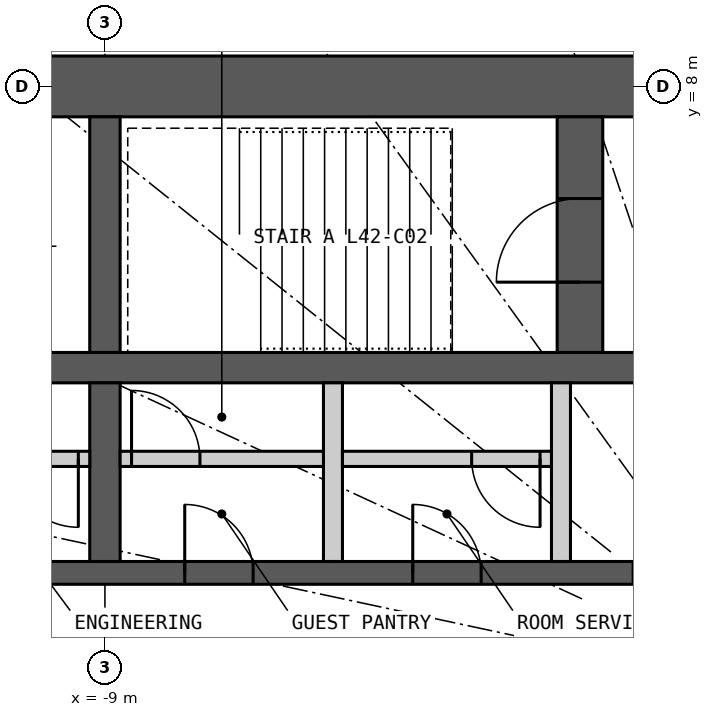
"""IFC4 building model, lengths in metres.
Left out: names, types, materials, properties, quantities, classifications, styles, units other than length and angle.
Written with IfcOpenShell. Run it as: python <this file> out.ifc"""

import sys

from ifc_helpers import new_model, si_unit, direction, frame, frame_2d, origin, place, context, subcontext, project, spatial, rectangle, extrude, element, fill, save


model = new_model("IFC4")
c1 = context("Model", 3, precision=1e-05, world=origin(), true_north=direction((0.0, 1.0)))
c2 = subcontext(c1, "Body", "Model", "MODEL_VIEW")
j1 = project(units=[si_unit("LENGTHUNIT", "METRE"), si_unit("PLANEANGLEUNIT", "RADIAN")], contexts=[c1])
p1 = place(None, origin())
s1 = spatial("IfcSite", under=j1, at=p1, CompositionType="ELEMENT")
p2 = place(p1, origin())
s2 = spatial("IfcBuilding", under=s1, at=p2, CompositionType="ELEMENT")
p3 = place(p2, frame((0.0, 0.0, 159.9)))
s3 = spatial("IfcBuildingStorey", under=s2, at=p3, CompositionType="ELEMENT", Elevation=159.9)
p4 = place(p3, frame((-12.4, 8.0, 0.0), z_axis=(0.0, 0.0, 1.0), x_axis=(1.0, 0.0, 0.0)))
e1 = element("IfcWall", 1, at=p4, inside=s3, PredefinedType="SHEAR", context=c2, shape_type="SweptSolid", body=[
    extrude(rectangle(XDim=24.8, YDim=0.8, at=frame_2d((12.4, 0.0))), origin(), (0.0, 0.0, 1.0), 3.3),
])
p5 = place(p4, frame((11.1, 0.0, 0.0)))
e2 = element("IfcOpeningElement", 2, at=p5, cuts=e1, PredefinedType="OPENING", context=c2, shape_type="SweptSolid", body=[
    extrude(rectangle(XDim=1.2, YDim=2.2, at=frame_2d((0.6, 1.1))), frame((0.0, 0.41, 0.0), z_axis=(0.0, -1.0, 0.0), x_axis=(1.0, 0.0, 0.0)), (0.0, 0.0, 1.0), 0.82),
])
p6 = place(p4, frame((18.7, 0.0, 0.0)))
e3 = element("IfcOpeningElement", 3, at=p6, cuts=e1, PredefinedType="OPENING", context=c2, shape_type="SweptSolid", body=[
    extrude(rectangle(XDim=0.9, YDim=2.2, at=frame_2d((0.45, 1.1))), frame((0.0, 0.41, 0.0), z_axis=(0.0, -1.0, 0.0), x_axis=(1.0, 0.0, 0.0)), (0.0, 0.0, 1.0), 0.82),
])
p7 = place(p3, frame((-11.6, 4.3, 0.0), z_axis=(0.0, 0.0, 1.0), x_axis=(1.0, 0.0, 0.0)))
e4 = element("IfcWall", 4, at=p7, inside=s3, PredefinedType="SHEAR", context=c2, shape_type="SweptSolid", body=[
    extrude(rectangle(XDim=23.2, YDim=0.4, at=frame_2d((11.6, 0.0))), origin(), (0.0, 0.0, 1.0), 3.3),
])
p8 = place(p3, frame((-11.6, 1.6, 0.0), z_axis=(0.0, 0.0, 1.0), x_axis=(1.0, 0.0, 0.0)))
e5 = element("IfcWall", 5, at=p8, inside=s3, PredefinedType="SHEAR", context=c2, shape_type="SweptSolid", body=[
    extrude(rectangle(XDim=23.2, YDim=0.3, at=frame_2d((11.6, 0.0))), origin(), (0.0, 0.0, 1.0), 3.3),
])
p9 = place(p8, frame((9.55, 0.0, 0.0)))
e6 = element("IfcOpeningElement", 6, at=p9, cuts=e5, PredefinedType="OPENING", context=c2, shape_type="SweptSolid", body=[
    extrude(rectangle(XDim=1.1, YDim=2.2, at=frame_2d((0.55, 1.1))), frame((0.0, 0.16, 0.0), z_axis=(0.0, -1.0, 0.0), x_axis=(1.0, 0.0, 0.0)), (0.0, 0.0, 1.0), 0.32),
])
p10 = place(p8, frame((12.55, 0.0, 0.0)))
e7 = element("IfcOpeningElement", 7, at=p10, cuts=e5, PredefinedType="OPENING", context=c2, shape_type="SweptSolid", body=[
    extrude(rectangle(XDim=1.1, YDim=2.2, at=frame_2d((0.55, 1.1))), frame((0.0, 0.16, 0.0), z_axis=(0.0, -1.0, 0.0), x_axis=(1.0, 0.0, 0.0)), (0.0, 0.0, 1.0), 0.32),
])
p11 = place(p8, frame((0.65, 0.0, 0.0)))
e8 = element("IfcOpeningElement", 8, at=p11, cuts=e5, PredefinedType="OPENING", context=c2, shape_type="SweptSolid", body=[
    extrude(rectangle(XDim=0.9, YDim=2.2, at=frame_2d((0.45, 1.1))), frame((0.0, 0.16, 0.0), z_axis=(0.0, -1.0, 0.0), x_axis=(1.0, 0.0, 0.0)), (0.0, 0.0, 1.0), 0.32),
])
p12 = place(p8, frame((21.65, 0.0, 0.0)))
e9 = element("IfcOpeningElement", 9, at=p12, cuts=e5, PredefinedType="OPENING", context=c2, shape_type="SweptSolid", body=[
    extrude(rectangle(XDim=0.9, YDim=2.2, at=frame_2d((0.45, 1.1))), frame((0.0, 0.16, 0.0), z_axis=(0.0, -1.0, 0.0), x_axis=(1.0, 0.0, 0.0)), (0.0, 0.0, 1.0), 0.32),
])
p13 = place(p8, frame((3.65, 0.0, 0.0)))
e10 = element("IfcOpeningElement", 10, at=p13, cuts=e5, PredefinedType="OPENING", context=c2, shape_type="SweptSolid", body=[
    extrude(rectangle(XDim=0.9, YDim=2.2, at=frame_2d((0.45, 1.1))), frame((0.0, 0.16, 0.0), z_axis=(0.0, -1.0, 0.0), x_axis=(1.0, 0.0, 0.0)), (0.0, 0.0, 1.0), 0.32),
])
p14 = place(p8, frame((6.65, 0.0, 0.0)))
e11 = element("IfcOpeningElement", 11, at=p14, cuts=e5, PredefinedType="OPENING", context=c2, shape_type="SweptSolid", body=[
    extrude(rectangle(XDim=0.9, YDim=2.2, at=frame_2d((0.45, 1.1))), frame((0.0, 0.16, 0.0), z_axis=(0.0, -1.0, 0.0), x_axis=(1.0, 0.0, 0.0)), (0.0, 0.0, 1.0), 0.32),
])
p15 = place(p3, frame((-9.0, 4.5, 0.0), z_axis=(0.0, 0.0, 1.0), x_axis=(0.0, 1.0, 0.0)))
e12 = element("IfcWall", 12, at=p15, inside=s3, PredefinedType="SHEAR", context=c2, shape_type="SweptSolid", body=[
    extrude(rectangle(XDim=3.1, YDim=0.4, at=frame_2d((1.55, 0.0))), origin(), (0.0, 0.0, 1.0), 3.3),
])
p16 = place(p3, frame((-9.0, 1.75, 0.0), z_axis=(0.0, 0.0, 1.0), x_axis=(0.0, 1.0, 0.0)))
e13 = element("IfcWall", 13, at=p16, inside=s3, PredefinedType="SHEAR", context=c2, shape_type="SweptSolid", body=[
    extrude(rectangle(XDim=2.35, YDim=0.4, at=frame_2d((1.175, 0.0))), origin(), (0.0, 0.0, 1.0), 3.3),
])
p17 = place(p3, frame((-2.75, 4.5, 0.0), z_axis=(0.0, 0.0, 1.0), x_axis=(0.0, 1.0, 0.0)))
e14 = element("IfcWall", 14, at=p17, inside=s3, PredefinedType="SHEAR", context=c2, shape_type="SweptSolid", body=[
    extrude(rectangle(XDim=3.1, YDim=0.6, at=frame_2d((1.55, 0.0))), origin(), (0.0, 0.0, 1.0), 3.3),
])
p18 = place(p17, frame((0.925, 0.0, 0.0)))
e15 = element("IfcOpeningElement", 15, at=p18, cuts=e14, PredefinedType="OPENING", context=c2, shape_type="SweptSolid", body=[
    extrude(rectangle(XDim=1.1, YDim=2.2, at=frame_2d((0.55, 1.1))), frame((0.0, 0.31, 0.0), z_axis=(0.0, -1.0, 0.0), x_axis=(1.0, 0.0, 0.0)), (0.0, 0.0, 1.0), 0.62),
])
for number, where, z_axis, x_axis in (
    (16, (-6.0, 1.75, 0.0), (0.0, 0.0, 1.0), (0.0, 1.0, 0.0)),
    (17, (-3.0, 1.75, 0.0), (0.0, 0.0, 1.0), (0.0, 1.0, 0.0)),
):
    element("IfcWall", number, at=place(p3, frame(where, z_axis=z_axis, x_axis=x_axis)), inside=s3, PredefinedType="PARTITIONING", context=c2, shape_type="SweptSolid", body=[
        extrude(rectangle(XDim=2.35, YDim=0.25, at=frame_2d((1.175, 0.0))), origin(), (0.0, 0.0, 1.0), 3.3),
    ])
p19 = place(p3, frame((-11.6, 3.1, 0.0), z_axis=(0.0, 0.0, 1.0), x_axis=(1.0, 0.0, 0.0)))
e18 = element("IfcWall", 18, at=p19, inside=s3, PredefinedType="PARTITIONING", context=c2, shape_type="SweptSolid", body=[
    extrude(rectangle(XDim=2.4, YDim=0.2, at=frame_2d((1.2, 0.0))), origin(), (0.0, 0.0, 1.0), 3.12),
])
p20 = place(p19, frame((1.35, 0.0, 0.0)))
e19 = element("IfcOpeningElement", 19, at=p20, cuts=e18, PredefinedType="OPENING", context=c2, shape_type="SweptSolid", body=[
    extrude(rectangle(XDim=0.9, YDim=2.2, at=frame_2d((0.45, 1.1))), frame((0.0, 0.11, 0.0), z_axis=(0.0, -1.0, 0.0), x_axis=(1.0, 0.0, 0.0)), (0.0, 0.0, 1.0), 0.22),
])
p21 = place(p3, frame((-8.8, 3.1, 0.0), z_axis=(0.0, 0.0, 1.0), x_axis=(1.0, 0.0, 0.0)))
e20 = element("IfcWall", 20, at=p21, inside=s3, PredefinedType="PARTITIONING", context=c2, shape_type="SweptSolid", body=[
    extrude(rectangle(XDim=2.675, YDim=0.2, at=frame_2d((1.337, 0.0))), origin(), (0.0, 0.0, 1.0), 3.12),
])
p22 = place(p21, frame((0.15, 0.0, 0.0)))
e21 = element("IfcOpeningElement", 21, at=p22, cuts=e20, PredefinedType="OPENING", context=c2, shape_type="SweptSolid", body=[
    extrude(rectangle(XDim=0.9, YDim=2.2, at=frame_2d((0.45, 1.1))), frame((0.0, 0.11, 0.0), z_axis=(0.0, -1.0, 0.0), x_axis=(1.0, 0.0, 0.0)), (0.0, 0.0, 1.0), 0.22),
])
p23 = place(p3, frame((-5.875, 3.1, 0.0), z_axis=(0.0, 0.0, 1.0), x_axis=(1.0, 0.0, 0.0)))
e22 = element("IfcWall", 22, at=p23, inside=s3, PredefinedType="PARTITIONING", context=c2, shape_type="SweptSolid", body=[
    extrude(rectangle(XDim=2.75, YDim=0.2, at=frame_2d((1.375, 0.0))), origin(), (0.0, 0.0, 1.0), 3.12),
])
p24 = place(p23, frame((1.7, 0.0, 0.0)))
e23 = element("IfcOpeningElement", 23, at=p24, cuts=e22, PredefinedType="OPENING", context=c2, shape_type="SweptSolid", body=[
    extrude(rectangle(XDim=0.9, YDim=2.2, at=frame_2d((0.45, 1.1))), frame((0.0, 0.11, 0.0), z_axis=(0.0, -1.0, 0.0), x_axis=(1.0, 0.0, 0.0)), (0.0, 0.0, 1.0), 0.22),
])
p25 = place(p18, origin())
e24 = element("IfcDoor", 24, at=p25, inside=s3, OperationType="SINGLE_SWING_LEFT", PredefinedType="DOOR", context=c2, shape_type="SweptSolid", body=[
    extrude(rectangle(XDim=1.1, YDim=2.2, at=frame_2d((0.55, 1.1))), frame((0.0, 0.025, 0.0), z_axis=(0.0, -1.0, 0.0), x_axis=(1.0, 0.0, 0.0)), (0.0, 0.0, 1.0), 0.05),
])
fill(e15, e24)
p26 = place(p20, origin())
e25 = element("IfcDoor", 25, at=p26, inside=s3, OperationType="SINGLE_SWING_RIGHT", PredefinedType="DOOR", context=c2, shape_type="SweptSolid", body=[
    extrude(rectangle(XDim=0.9, YDim=2.2, at=frame_2d((0.45, 1.1))), frame((0.0, 0.025, 0.0), z_axis=(0.0, -1.0, 0.0), x_axis=(1.0, 0.0, 0.0)), (0.0, 0.0, 1.0), 0.05),
])
fill(e19, e25)
p27 = place(p13, origin())
e26 = element("IfcDoor", 26, at=p27, inside=s3, OperationType="SINGLE_SWING_LEFT", PredefinedType="DOOR", context=c2, shape_type="SweptSolid", body=[
    extrude(rectangle(XDim=0.9, YDim=2.2, at=frame_2d((0.45, 1.1))), frame((0.0, 0.025, 0.0), z_axis=(0.0, -1.0, 0.0), x_axis=(1.0, 0.0, 0.0)), (0.0, 0.0, 1.0), 0.05),
])
fill(e10, e26)
p28 = place(p22, origin())
e27 = element("IfcDoor", 27, at=p28, inside=s3, OperationType="SINGLE_SWING_LEFT", PredefinedType="DOOR", context=c2, shape_type="SweptSolid", body=[
    extrude(rectangle(XDim=0.9, YDim=2.2, at=frame_2d((0.45, 1.1))), frame((0.0, 0.025, 0.0), z_axis=(0.0, -1.0, 0.0), x_axis=(1.0, 0.0, 0.0)), (0.0, 0.0, 1.0), 0.05),
])
fill(e21, e27)
p29 = place(p14, origin())
e28 = element("IfcDoor", 28, at=p29, inside=s3, OperationType="SINGLE_SWING_LEFT", PredefinedType="DOOR", context=c2, shape_type="SweptSolid", body=[
    extrude(rectangle(XDim=0.9, YDim=2.2, at=frame_2d((0.45, 1.1))), frame((0.0, 0.025, 0.0), z_axis=(0.0, -1.0, 0.0), x_axis=(1.0, 0.0, 0.0)), (0.0, 0.0, 1.0), 0.05),
])
fill(e11, e28)
p30 = place(p24, origin())
e29 = element("IfcDoor", 29, at=p30, inside=s3, OperationType="SINGLE_SWING_RIGHT", PredefinedType="DOOR", context=c2, shape_type="SweptSolid", body=[
    extrude(rectangle(XDim=0.9, YDim=2.2, at=frame_2d((0.45, 1.1))), frame((0.0, 0.025, 0.0), z_axis=(0.0, -1.0, 0.0), x_axis=(1.0, 0.0, 0.0)), (0.0, 0.0, 1.0), 0.05),
])
fill(e23, e29)
save(model, sys.argv[1])
